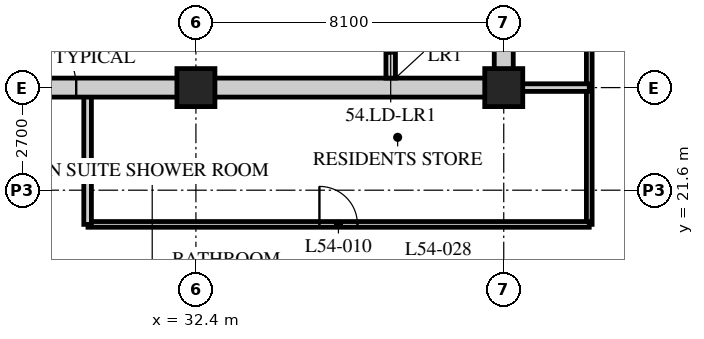
"""IFC4 building model, lengths in metres.
Left out: names, types, materials, properties, quantities, classifications, styles, units other than length and angle.
Written with IfcOpenShell. Run it as: python <this file> out.ifc"""

import sys

from ifc_helpers import new_model, si_unit, direction, frame, frame_2d, origin, origin_2d, place, context, subcontext, project, spatial, rectangle, hollow_rectangle, extrude, element, fill, save


model = new_model("IFC4")
c1 = context("Model", 3, precision=1e-05, world=origin(), true_north=direction((0.0, 1.0)))
c2 = subcontext(c1, "Body", "Model", "MODEL_VIEW")
j1 = project(units=[si_unit("LENGTHUNIT", "METRE"), si_unit("PLANEANGLEUNIT", "RADIAN")], contexts=[c1])
p1 = place(None, origin())
s1 = spatial("IfcSite", under=j1, at=p1, CompositionType="ELEMENT")
p2 = place(p1, origin())
s2 = spatial("IfcBuilding", under=s1, at=p2, CompositionType="ELEMENT")
p3 = place(p2, frame((0.0, 0.0, 210.0)))
s3 = spatial("IfcBuildingStorey", under=s2, at=p3, CompositionType="ELEMENT", Elevation=210.0)
for number, where, z_axis, x_axis in (
    (1, (32.4, 24.3, 0.0), (0.0, 0.0, 1.0), (1.0, 0.0, 0.0)),
    (2, (40.5, 24.3, 0.0), (0.0, 0.0, 1.0), (1.0, 0.0, 0.0)),
):
    element("IfcColumn", number, at=place(p3, frame(where, z_axis=z_axis, x_axis=x_axis)), inside=s3, PredefinedType="COLUMN", context=c2, shape_type="SweptSolid", body=[
        extrude(hollow_rectangle(XDim=1.0, YDim=1.0, WallThickness=0.1, at=origin_2d()), origin(), (0.0, 0.0, 1.0), 3.6),
    ])
p4 = place(p3, frame((42.75, 20.7, 0.0), z_axis=(0.0, 0.0, 1.0), x_axis=(0.0, 1.0, 0.0)))
e3 = element("IfcWall", 3, at=p4, inside=s3, PredefinedType="PARTITIONING", context=c2, shape_type="SweptSolid", body=[
    extrude(rectangle(XDim=24.75, YDim=0.15, at=frame_2d((12.375, 0.0))), origin(), (0.0, 0.0, 1.0), 3.39),
])
p5 = place(p4, frame((7.15, 0.0, 0.0)))
e4 = element("IfcOpeningElement", 4, at=p5, cuts=e3, PredefinedType="OPENING", context=c2, shape_type="SweptSolid", body=[
    extrude(rectangle(XDim=1.0, YDim=2.1, at=frame_2d((0.5, 1.05))), frame((0.0, 0.085, 0.0), z_axis=(0.0, -1.0, 0.0), x_axis=(1.0, 0.0, 0.0)), (0.0, 0.0, 1.0), 0.17),
])
p6 = place(p4, frame((15.25, 0.0, 0.0)))
e5 = element("IfcOpeningElement", 5, at=p6, cuts=e3, PredefinedType="OPENING", context=c2, shape_type="SweptSolid", body=[
    extrude(rectangle(XDim=1.0, YDim=2.1, at=frame_2d((0.5, 1.05))), frame((0.0, 0.085, 0.0), z_axis=(0.0, -1.0, 0.0), x_axis=(1.0, 0.0, 0.0)), (0.0, 0.0, 1.0), 0.17),
])
p7 = place(p3, frame((29.56, 20.7, 0.0), z_axis=(0.0, 0.0, 1.0), x_axis=(1.0, 0.0, 0.0)))
e6 = element("IfcWall", 6, at=p7, inside=s3, PredefinedType="PARTITIONING", context=c2, shape_type="SweptSolid", body=[
    extrude(rectangle(XDim=13.19, YDim=0.15, at=frame_2d((6.595, 0.0))), origin(), (0.0, 0.0, 1.0), 3.39),
])
p8 = place(p7, frame((6.09, 0.0, 0.0)))
e7 = element("IfcOpeningElement", 7, at=p8, cuts=e6, PredefinedType="OPENING", context=c2, shape_type="SweptSolid", body=[
    extrude(rectangle(XDim=1.0, YDim=2.1, at=frame_2d((0.5, 1.05))), frame((0.0, 0.085, 0.0), z_axis=(0.0, -1.0, 0.0), x_axis=(1.0, 0.0, 0.0)), (0.0, 0.0, 1.0), 0.17),
])
p9 = place(p3, frame((29.55, 20.7, 0.0), z_axis=(0.0, 0.0, 1.0), x_axis=(0.0, 1.0, 0.0)))
e8 = element("IfcWall", 8, at=p9, inside=s3, PredefinedType="SOLIDWALL", context=c2, shape_type="SweptSolid", body=[
    extrude(rectangle(XDim=3.6, YDim=0.2, at=frame_2d((1.8, 0.0))), origin(), (0.0, 0.0, 1.0), 3.39),
])
p10 = place(p3, frame((40.5, 24.3, 0.0), z_axis=(0.0, 0.0, 1.0), x_axis=(1.0, 0.0, 0.0)))
e9 = element("IfcWall", 9, at=p10, inside=s3, PredefinedType="SOLIDWALL", context=c2, shape_type="SweptSolid", body=[
    extrude(rectangle(XDim=2.25, YDim=0.2, at=frame_2d((1.125, 0.0))), origin(), (0.0, 0.0, 1.0), 3.39),
])
p11 = place(p3, frame((15.95, 24.3, 0.0), z_axis=(0.0, 0.0, 1.0), x_axis=(1.0, 0.0, 0.0)))
e10 = element("IfcWall", 10, at=p11, inside=s3, PredefinedType="SOLIDWALL", context=c2, shape_type="SweptSolid", body=[
    extrude(rectangle(XDim=24.8, YDim=0.5, at=frame_2d((12.4, 0.0))), origin(), (0.0, 0.0, 1.0), 2.74),
])
p12 = place(p11, frame((11.5, 0.0, 0.0)))
e11 = element("IfcOpeningElement", 11, at=p12, cuts=e10, PredefinedType="OPENING", context=c2, shape_type="SweptSolid", body=[
    extrude(rectangle(XDim=1.8, YDim=2.4, at=frame_2d((0.9, 1.2))), frame((0.0, 0.26, 0.0), z_axis=(0.0, -1.0, 0.0), x_axis=(1.0, 0.0, 0.0)), (0.0, 0.0, 1.0), 0.52),
])
p13 = place(p3, frame((40.5, 24.55, 0.0), z_axis=(0.0, 0.0, 1.0), x_axis=(0.0, 1.0, 0.0)))
e12 = element("IfcWall", 12, at=p13, inside=s3, PredefinedType="SOLIDWALL", context=c2, shape_type="SweptSolid", body=[
    extrude(rectangle(XDim=15.7, YDim=0.5, at=frame_2d((7.85, 0.0))), origin(), (0.0, 0.0, 1.0), 2.778),
])
p14 = place(p3, frame((37.525, 24.55, 0.0), z_axis=(0.0, 0.0, 1.0), x_axis=(0.0, 1.0, 0.0)))
e13 = element("IfcWall", 13, at=p14, inside=s3, PredefinedType="SOLIDWALL", context=c2, shape_type="SweptSolid", body=[
    extrude(rectangle(XDim=7.75, YDim=0.25, at=frame_2d((3.875, 0.0))), origin(), (0.0, 0.0, 1.0), 3.39),
])
p15 = place(p14, frame((0.65, 0.0, 0.0)))
e14 = element("IfcOpeningElement", 14, at=p15, cuts=e13, PredefinedType="OPENING", context=c2, shape_type="SweptSolid", body=[
    extrude(rectangle(XDim=1.1, YDim=2.4, at=frame_2d((0.55, 1.2))), frame((0.0, 0.135, 0.0), z_axis=(0.0, -1.0, 0.0), x_axis=(1.0, 0.0, 0.0)), (0.0, 0.0, 1.0), 0.27),
])
p16 = place(p14, frame((3.25, 0.0, 0.0)))
e15 = element("IfcOpeningElement", 15, at=p16, cuts=e13, PredefinedType="OPENING", context=c2, shape_type="SweptSolid", body=[
    extrude(rectangle(XDim=1.1, YDim=2.4, at=frame_2d((0.55, 1.2))), frame((0.0, 0.135, 0.0), z_axis=(0.0, -1.0, 0.0), x_axis=(1.0, 0.0, 0.0)), (0.0, 0.0, 1.0), 0.27),
])
p17 = place(p14, frame((5.85, 0.0, 0.0)))
e16 = element("IfcOpeningElement", 16, at=p17, cuts=e13, PredefinedType="OPENING", context=c2, shape_type="SweptSolid", body=[
    extrude(rectangle(XDim=1.1, YDim=2.4, at=frame_2d((0.55, 1.2))), frame((0.0, 0.135, 0.0), z_axis=(0.0, -1.0, 0.0), x_axis=(1.0, 0.0, 0.0)), (0.0, 0.0, 1.0), 0.27),
])
p18 = place(p8, origin())
e17 = element("IfcDoor", 17, at=p18, inside=s3, OperationType="SINGLE_SWING_LEFT", PredefinedType="DOOR", context=c2, shape_type="SweptSolid", body=[
    extrude(rectangle(XDim=1.0, YDim=2.1, at=frame_2d((0.5, 1.05))), frame((0.0, 0.025, 0.0), z_axis=(0.0, -1.0, 0.0), x_axis=(1.0, 0.0, 0.0)), (0.0, 0.0, 1.0), 0.05),
])
fill(e7, e17)
p19 = place(p15, origin())
e18 = element("IfcDoor", 18, at=p19, inside=s3, OperationType="DOUBLE_DOOR_SLIDING", PredefinedType="DOOR", context=c2, shape_type="SweptSolid", body=[
    extrude(rectangle(XDim=1.1, YDim=2.4, at=frame_2d((0.55, 1.2))), frame((0.0, 0.025, 0.0), z_axis=(0.0, -1.0, 0.0), x_axis=(1.0, 0.0, 0.0)), (0.0, 0.0, 1.0), 0.05),
])
fill(e14, e18)
p20 = place(p12, origin())
e19 = element("IfcDoor", 19, at=p20, inside=s3, OperationType="DOUBLE_DOOR_SINGLE_SWING", PredefinedType="DOOR", context=c2, shape_type="SweptSolid", body=[
    extrude(rectangle(XDim=1.8, YDim=2.4, at=frame_2d((0.9, 1.2))), frame((0.0, 0.025, 0.0), z_axis=(0.0, -1.0, 0.0), x_axis=(1.0, 0.0, 0.0)), (0.0, 0.0, 1.0), 0.05),
])
fill(e11, e19)
save(model, sys.argv[1])
